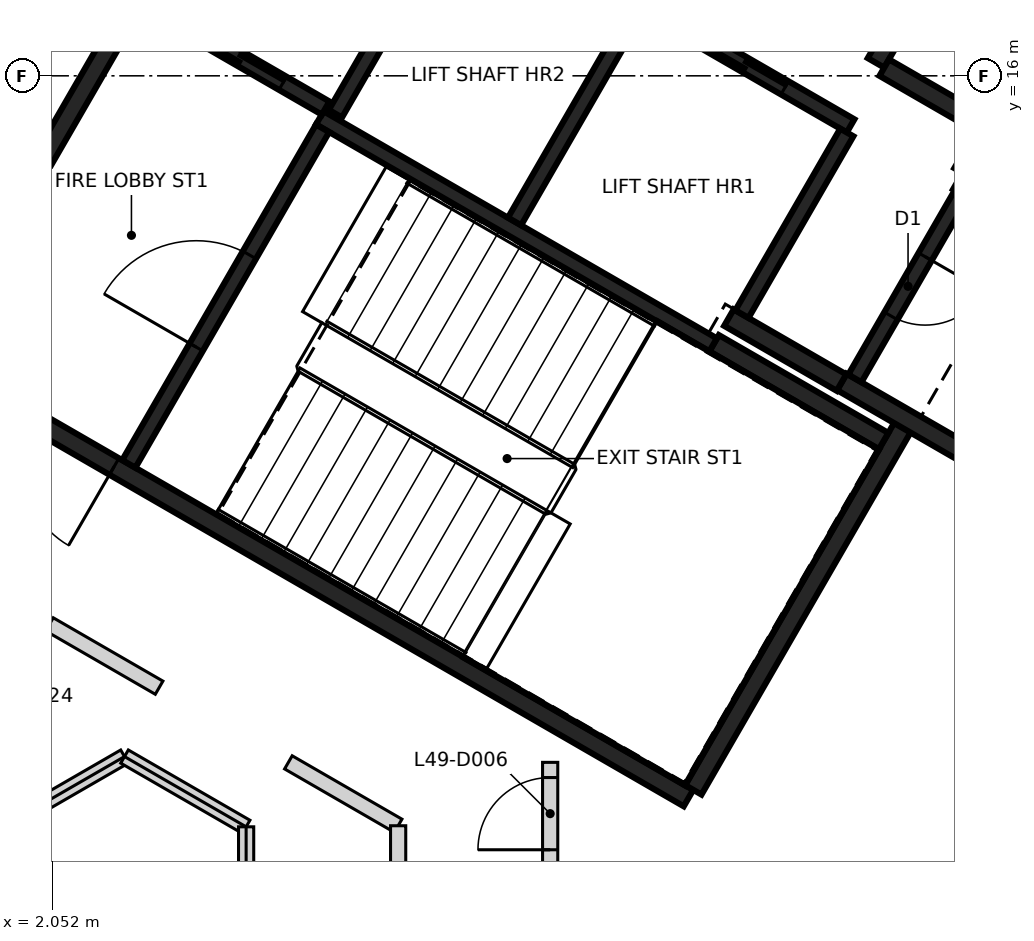
"""IFC4 building model, lengths in metres.
Left out: names, types, materials, properties, quantities, classifications, styles, units other than length and angle.
Written with IfcOpenShell. Run it as: python <this file> out.ifc"""

import sys

from ifc_helpers import new_model, si_unit, direction, frame, frame_2d, origin, place, context, subcontext, project, spatial, rectangle, extrude, element, fill, save


model = new_model("IFC4")
c1 = context("Model", 3, precision=1e-05, world=origin(), true_north=direction((0.0, 1.0)))
c2 = subcontext(c1, "Body", "Model", "MODEL_VIEW")
j1 = project(units=[si_unit("LENGTHUNIT", "METRE"), si_unit("PLANEANGLEUNIT", "RADIAN")], contexts=[c1])
p1 = place(None, origin())
s1 = spatial("IfcSite", under=j1, at=p1, CompositionType="ELEMENT")
p2 = place(p1, origin())
s2 = spatial("IfcBuilding", under=s1, at=p2, CompositionType="ELEMENT")
p3 = place(p2, frame((0.0, 0.0, 197.2)))
s3 = spatial("IfcBuildingStorey", under=s2, at=p3, CompositionType="ELEMENT", Elevation=197.2)
p4 = place(p3, frame((10.42, 6.498, 0.0), z_axis=(0.0, 0.0, 1.0), x_axis=(-0.866021906294, 0.500006057782, 0.0)))
e1 = element("IfcWall", 1, at=p4, inside=s3, PredefinedType="SHEAR", context=c2, shape_type="SweptSolid", body=[
    extrude(rectangle(XDim=11.55, YDim=0.25, at=frame_2d((5.775, 0.0))), origin(), (0.0, 0.0, 1.0), 3.25),
])
p5 = place(p4, frame((10.025, 0.0, 0.0)))
e2 = element("IfcOpeningElement", 2, at=p5, cuts=e1, PredefinedType="OPENING", context=c2, shape_type="SweptSolid", body=[
    extrude(rectangle(XDim=1.2, YDim=2.1, at=frame_2d((0.6, 1.05))), frame((0.0, 0.135, 0.0), z_axis=(0.0, -1.0, 0.0), x_axis=(1.0, 0.0, 0.0)), (0.0, 0.0, 1.0), 0.27),
])
p6 = place(p4, frame((8.725, 0.0, 0.0)))
e3 = element("IfcOpeningElement", 3, at=p6, cuts=e1, PredefinedType="OPENING", context=c2, shape_type="SweptSolid", body=[
    extrude(rectangle(XDim=1.2, YDim=2.1, at=frame_2d((0.6, 1.05))), frame((0.0, 0.135, 0.0), z_axis=(0.0, -1.0, 0.0), x_axis=(1.0, 0.0, 0.0)), (0.0, 0.0, 1.0), 0.27),
])
p7 = place(p3, frame((0.48, 12.381, 0.0), z_axis=(0.0, 0.0, 1.0), x_axis=(0.49999885962, 0.866026062182, 0.0)))
e4 = element("IfcWall", 4, at=p7, inside=s3, PredefinedType="SHEAR", context=c2, shape_type="SweptSolid", body=[
    extrude(rectangle(XDim=5.225, YDim=0.25, at=frame_2d((2.612, 0.0))), origin(), (0.0, 0.0, 1.0), 3.25),
])
p8 = place(p3, frame((13.238, 11.378, 0.0), z_axis=(0.0, 0.0, 1.0), x_axis=(-0.500008851346, -0.866020293397, 0.0)))
e5 = element("IfcWall", 5, at=p8, inside=s3, PredefinedType="SHEAR", context=c2, shape_type="SweptSolid", body=[
    extrude(rectangle(XDim=5.51, YDim=0.25, at=frame_2d((2.755, 0.0))), origin(), (0.0, 0.0, 1.0), 3.25),
])
p9 = place(p3, frame((14.918, 10.54, 0.0), z_axis=(0.0, 0.0, 1.0), x_axis=(-0.866063538972, 0.499933942099, 0.0)))
e6 = element("IfcWall", 6, at=p9, inside=s3, PredefinedType="SHEAR", context=c2, shape_type="SweptSolid", body=[
    extrude(rectangle(XDim=2.865, YDim=0.25, at=frame_2d((1.432, 0.0))), origin(), (0.0, 0.0, 1.0), 3.25),
])
p10 = place(p3, frame((13.963, 14.614, 0.0), z_axis=(0.0, 0.0, 1.0), x_axis=(0.866042235819, -0.499970844928, 0.0)))
e7 = element("IfcWall", 7, at=p10, inside=s3, PredefinedType="SHEAR", context=c2, shape_type="SweptSolid", body=[
    extrude(rectangle(XDim=2.865, YDim=0.25, at=frame_2d((1.432, 0.0))), origin(), (0.0, 0.0, 1.0), 3.25),
])
p11 = place(p3, frame((10.757, 12.481, 0.0), z_axis=(0.0, 0.0, 1.0), x_axis=(0.866022940537, -0.500004266446, 0.0)))
e8 = element("IfcWall", 8, at=p11, inside=s3, PredefinedType="SHEAR", context=c2, shape_type="SweptSolid", body=[
    extrude(rectangle(XDim=2.575, YDim=0.25, at=frame_2d((1.287, 0.0))), origin(), (0.0, 0.0, 1.0), 3.25),
])
p12 = place(p3, frame((13.819, 17.785, 0.0), z_axis=(0.0, 0.0, 1.0), x_axis=(-0.500039802285, -0.866002422705, 0.0)))
e9 = element("IfcWall", 9, at=p12, inside=s3, PredefinedType="SHEAR", context=c2, shape_type="SweptSolid", body=[
    extrude(rectangle(XDim=1.865, YDim=0.25, at=frame_2d((0.932, 0.0))), origin(), (0.0, 0.0, 1.0), 3.25),
])
p13 = place(p3, frame((12.433, 11.964, 0.0), z_axis=(0.0, 0.0, 1.0), x_axis=(-0.866038183914, 0.499977863513, 0.0)))
e10 = element("IfcWall", 10, at=p13, inside=s3, PredefinedType="SHEAR", context=c2, shape_type="SweptSolid", body=[
    extrude(rectangle(XDim=1.71, YDim=0.25, at=frame_2d((0.855, 0.0))), origin(), (0.0, 0.0, 1.0), 3.25),
])
p14 = place(p3, frame((12.995, 16.108, 0.0), z_axis=(0.0, 0.0, 1.0), x_axis=(0.866044474677, -0.49996696679, 0.0)))
e11 = element("IfcWall", 11, at=p14, inside=s3, PredefinedType="SHEAR", context=c2, shape_type="SweptSolid", body=[
    extrude(rectangle(XDim=1.584, YDim=0.25, at=frame_2d((0.792, 0.0))), origin(), (0.0, 0.0, 1.0), 3.25),
])
p15 = place(p3, frame((14.305, 15.207, 0.0), z_axis=(0.0, 0.0, 1.0), x_axis=(-0.499848422343, -0.866112899501, 0.0)))
e12 = element("IfcWall", 12, at=p15, inside=s3, PredefinedType="SHEAR", context=c2, shape_type="SweptSolid", body=[
    extrude(rectangle(XDim=0.559, YDim=0.25, at=frame_2d((0.28, 0.0))), origin(), (0.0, 0.0, 1.0), 3.25),
])
p16 = place(p3, frame((12.552, 15.342, 0.0), z_axis=(0.0, 0.0, 1.0), x_axis=(-0.866030299012, 0.499991521122, 0.0)))
e13 = element("IfcWall", 13, at=p16, inside=s3, PredefinedType="SHEAR", context=c2, shape_type="SweptSolid", body=[
    extrude(rectangle(XDim=6.1, YDim=0.2, at=frame_2d((3.05, 0.0))), origin(), (0.0, 0.0, 1.0), 3.25),
])
p17 = place(p16, frame((1.0, 0.0, 0.0)))
e14 = element("IfcOpeningElement", 14, at=p17, cuts=e13, PredefinedType="OPENING", context=c2, shape_type="SweptSolid", body=[
    extrude(rectangle(XDim=1.2, YDim=2.1, at=frame_2d((0.6, 1.05))), frame((0.0, 0.11, 0.0), z_axis=(0.0, -1.0, 0.0), x_axis=(1.0, 0.0, 0.0)), (0.0, 0.0, 1.0), 0.22),
])
p18 = place(p16, frame((3.982, 0.0, 0.0)))
e15 = element("IfcOpeningElement", 15, at=p18, cuts=e13, PredefinedType="OPENING", context=c2, shape_type="SweptSolid", body=[
    extrude(rectangle(XDim=1.2, YDim=2.1, at=frame_2d((0.6, 1.05))), frame((0.0, 0.11, 0.0), z_axis=(0.0, -1.0, 0.0), x_axis=(1.0, 0.0, 0.0)), (0.0, 0.0, 1.0), 0.22),
])
p19 = place(p3, frame((10.743, 12.46, 0.0), z_axis=(0.0, 0.0, 1.0), x_axis=(-0.866018848283, 0.500011354289, 0.0)))
e16 = element("IfcWall", 16, at=p19, inside=s3, PredefinedType="SHEAR", context=c2, shape_type="SweptSolid", body=[
    extrude(rectangle(XDim=5.974, YDim=0.2, at=frame_2d((2.987, 0.0))), origin(), (0.0, 0.0, 1.0), 3.25),
])
p20 = place(p3, frame((3.057, 10.895, 0.0), z_axis=(0.0, 0.0, 1.0), x_axis=(0.500027839223, 0.866009330205, 0.0)))
e17 = element("IfcWall", 17, at=p20, inside=s3, PredefinedType="SHEAR", context=c2, shape_type="SweptSolid", body=[
    extrude(rectangle(XDim=5.098, YDim=0.2, at=frame_2d((2.549, 0.0))), origin(), (0.0, 0.0, 1.0), 3.25),
])
p21 = place(p20, frame((1.774, 0.0, 0.0)))
e18 = element("IfcOpeningElement", 18, at=p21, cuts=e17, PredefinedType="OPENING", context=c2, shape_type="SweptSolid", body=[
    extrude(rectangle(XDim=1.4, YDim=2.1, at=frame_2d((0.7, 1.05))), frame((0.0, 0.11, 0.0), z_axis=(0.0, -1.0, 0.0), x_axis=(1.0, 0.0, 0.0)), (0.0, 0.0, 1.0), 0.22),
])
p22 = place(p3, frame((8.132, 14.084, 0.0), z_axis=(0.0, 0.0, 1.0), x_axis=(0.500030834389, 0.86600760081, 0.0)))
e19 = element("IfcWall", 19, at=p22, inside=s3, PredefinedType="SHEAR", context=c2, shape_type="SweptSolid", body=[
    extrude(rectangle(XDim=3.198, YDim=0.2, at=frame_2d((1.599, 0.0))), origin(), (0.0, 0.0, 1.0), 3.25),
])
p23 = place(p3, frame((14.008, 14.442, 0.0), z_axis=(0.0, 0.0, 1.0), x_axis=(-0.499986818241, -0.866033014143, 0.0)))
e20 = element("IfcWall", 20, at=p23, inside=s3, PredefinedType="SHEAR", context=c2, shape_type="SweptSolid", body=[
    extrude(rectangle(XDim=2.798, YDim=0.2, at=frame_2d((1.399, 0.0))), origin(), (0.0, 0.0, 1.0), 3.25),
])
p24 = place(p23, frame((0.949, 0.0, 0.0)))
e21 = element("IfcOpeningElement", 21, at=p24, cuts=e20, PredefinedType="OPENING", context=c2, shape_type="SweptSolid", body=[
    extrude(rectangle(XDim=0.9, YDim=2.1, at=frame_2d((0.45, 1.05))), frame((0.0, 0.11, 0.0), z_axis=(0.0, -1.0, 0.0), x_axis=(1.0, 0.0, 0.0)), (0.0, 0.0, 1.0), 0.22),
])
p25 = place(p3, frame((12.502, 15.255, 0.0), z_axis=(0.0, 0.0, 1.0), x_axis=(-0.499965018551, -0.866045599391, 0.0)))
e22 = element("IfcWall", 22, at=p25, inside=s3, PredefinedType="SHEAR", context=c2, shape_type="SweptSolid", body=[
    extrude(rectangle(XDim=2.759, YDim=0.2, at=frame_2d((1.379, 0.0))), origin(), (0.0, 0.0, 1.0), 3.25),
])
p26 = place(p3, frame((7.324, 18.187, 0.0), z_axis=(0.0, 0.0, 1.0), x_axis=(-0.499967891604, -0.866043940782, 0.0)))
e23 = element("IfcWall", 23, at=p26, inside=s3, PredefinedType="SHEAR", context=c2, shape_type="SweptSolid", body=[
    extrude(rectangle(XDim=3.1, YDim=0.2, at=frame_2d((1.55, 0.0))), origin(), (0.0, 0.0, 1.0), 3.25),
])
p27 = place(p3, frame((5.646, 15.576, 0.0), z_axis=(0.0, 0.0, 1.0), x_axis=(-0.866018407898, 0.500012117035, 0.0)))
e24 = element("IfcWall", 24, at=p27, inside=s3, PredefinedType="SHEAR", context=c2, shape_type="SweptSolid", body=[
    extrude(rectangle(XDim=2.651, YDim=0.2, at=frame_2d((1.325, 0.0))), origin(), (0.0, 0.0, 1.0), 3.25),
])
p28 = place(p27, frame((0.652, 0.0, 0.0)))
e25 = element("IfcOpeningElement", 25, at=p28, cuts=e24, PredefinedType="OPENING", context=c2, shape_type="SweptSolid", body=[
    extrude(rectangle(XDim=1.3, YDim=2.1, at=frame_2d((0.65, 1.05))), frame((0.0, 0.11, 0.0), z_axis=(0.0, -1.0, 0.0), x_axis=(1.0, 0.0, 0.0)), (0.0, 0.0, 1.0), 0.22),
])
p29 = place(p3, frame((-8.611, 2.648, 0.0), z_axis=(0.0, 0.0, 1.0), x_axis=(0.865953566425, 0.500124405319, 0.0)))
e26 = element("IfcWall", 26, at=p29, inside=s3, PredefinedType="PARTITIONING", context=c2, shape_type="SweptSolid", body=[
    extrude(rectangle(XDim=12.267, YDim=0.2, at=frame_2d((6.134, 0.0))), origin(), (0.0, 0.0, 1.0), 3.25),
])
p30 = place(p29, frame((9.904, 0.0, 0.0)))
e27 = element("IfcOpeningElement", 27, at=p30, cuts=e26, PredefinedType="OPENING", context=c2, shape_type="SweptSolid", body=[
    extrude(rectangle(XDim=0.9, YDim=2.1, at=frame_2d((0.45, 1.05))), frame((0.0, 0.11, 0.0), z_axis=(0.0, -1.0, 0.0), x_axis=(1.0, 0.0, 0.0)), (0.0, 0.0, 1.0), 0.22),
])
p31 = place(p29, frame((5.683, 0.0, 0.0)))
e28 = element("IfcOpeningElement", 28, at=p31, cuts=e26, PredefinedType="OPENING", context=c2, shape_type="SweptSolid", body=[
    extrude(rectangle(XDim=0.9, YDim=2.1, at=frame_2d((0.45, 1.05))), frame((0.0, 0.11, 0.0), z_axis=(0.0, -1.0, 0.0), x_axis=(1.0, 0.0, 0.0)), (0.0, 0.0, 1.0), 0.22),
])
p32 = place(p29, frame((1.463, 0.0, 0.0)))
e29 = element("IfcOpeningElement", 29, at=p32, cuts=e26, PredefinedType="OPENING", context=c2, shape_type="SweptSolid", body=[
    extrude(rectangle(XDim=0.9, YDim=2.1, at=frame_2d((0.45, 1.05))), frame((0.0, 0.11, 0.0), z_axis=(0.0, -1.0, 0.0), x_axis=(1.0, 0.0, 0.0)), (0.0, 0.0, 1.0), 0.22),
])
p33 = place(p3, frame((-1.086, 12.65, 0.0), z_axis=(0.0, 0.0, 1.0), x_axis=(0.492507119433, 0.870308415051, 0.0)))
e30 = element("IfcWall", 30, at=p33, inside=s3, PredefinedType="PARTITIONING", context=c2, shape_type="SweptSolid", body=[
    extrude(rectangle(XDim=10.531, YDim=0.2, at=frame_2d((5.266, 0.0))), origin(), (0.0, 0.0, 1.0), 3.25),
])
p34 = place(p33, frame((8.411, 0.0, 0.0)))
e31 = element("IfcOpeningElement", 31, at=p34, cuts=e30, PredefinedType="OPENING", context=c2, shape_type="SweptSolid", body=[
    extrude(rectangle(XDim=0.9, YDim=2.1, at=frame_2d((0.45, 1.05))), frame((0.0, 0.11, 0.0), z_axis=(0.0, -1.0, 0.0), x_axis=(1.0, 0.0, 0.0)), (0.0, 0.0, 1.0), 0.22),
])
p35 = place(p33, frame((3.664, 0.0, 0.0)))
e32 = element("IfcOpeningElement", 32, at=p35, cuts=e30, PredefinedType="OPENING", context=c2, shape_type="SweptSolid", body=[
    extrude(rectangle(XDim=0.95, YDim=2.1, at=frame_2d((0.475, 1.05))), frame((0.0, 0.11, 0.0), z_axis=(0.0, -1.0, 0.0), x_axis=(1.0, 0.0, 0.0)), (0.0, 0.0, 1.0), 0.22),
])
p36 = place(p3, frame((2.012, 8.784, 0.0), z_axis=(0.0, 0.0, 1.0), x_axis=(0.865934186891, -0.500157959022, 0.0)))
e33 = element("IfcWall", 33, at=p36, inside=s3, PredefinedType="PARTITIONING", context=c2, shape_type="SweptSolid", body=[
    extrude(rectangle(XDim=1.666, YDim=0.2, at=frame_2d((0.833, 0.0))), origin(), (0.0, 0.0, 1.0), 3.25),
])
p37 = place(p3, frame((5.156, 6.968, 0.0), z_axis=(0.0, 0.0, 1.0), x_axis=(0.865963705197, -0.500106849865, 0.0)))
e34 = element("IfcWall", 34, at=p37, inside=s3, PredefinedType="PARTITIONING", context=c2, shape_type="SweptSolid", body=[
    extrude(rectangle(XDim=1.668, YDim=0.2, at=frame_2d((0.834, 0.0))), origin(), (0.0, 0.0, 1.0), 3.25),
])
p38 = place(p3, frame((6.6, -6.134, 0.0), z_axis=(0.0, 0.0, 1.0), x_axis=(0.0, 1.0, 0.0)))
e35 = element("IfcWall", 35, at=p38, inside=s3, PredefinedType="PARTITIONING", context=c2, shape_type="SweptSolid", body=[
    extrude(rectangle(XDim=12.268, YDim=0.2, at=frame_2d((6.134, 0.0))), origin(), (0.0, 0.0, 1.0), 3.25),
])
p39 = place(p38, frame((1.463, 0.0, 0.0)))
e36 = element("IfcOpeningElement", 36, at=p39, cuts=e35, PredefinedType="OPENING", context=c2, shape_type="SweptSolid", body=[
    extrude(rectangle(XDim=0.9, YDim=2.1, at=frame_2d((0.45, 1.05))), frame((0.0, 0.11, 0.0), z_axis=(0.0, -1.0, 0.0), x_axis=(1.0, 0.0, 0.0)), (0.0, 0.0, 1.0), 0.22),
])
p40 = place(p38, frame((5.684, 0.0, 0.0)))
e37 = element("IfcOpeningElement", 37, at=p40, cuts=e35, PredefinedType="OPENING", context=c2, shape_type="SweptSolid", body=[
    extrude(rectangle(XDim=0.9, YDim=2.1, at=frame_2d((0.45, 1.05))), frame((0.0, 0.11, 0.0), z_axis=(0.0, -1.0, 0.0), x_axis=(1.0, 0.0, 0.0)), (0.0, 0.0, 1.0), 0.22),
])
p41 = place(p38, frame((9.905, 0.0, 0.0)))
e38 = element("IfcOpeningElement", 38, at=p41, cuts=e35, PredefinedType="OPENING", context=c2, shape_type="SweptSolid", body=[
    extrude(rectangle(XDim=0.9, YDim=2.1, at=frame_2d((0.45, 1.05))), frame((0.0, 0.11, 0.0), z_axis=(0.0, -1.0, 0.0), x_axis=(1.0, 0.0, 0.0)), (0.0, 0.0, 1.0), 0.22),
])
p42 = place(p3, frame((8.6, -4.966, 0.0), z_axis=(0.0, 0.0, 1.0), x_axis=(0.0, 1.0, 0.0)))
e39 = element("IfcWall", 39, at=p42, inside=s3, PredefinedType="PARTITIONING", context=c2, shape_type="SweptSolid", body=[
    extrude(rectangle(XDim=11.934, YDim=0.2, at=frame_2d((5.967, 0.0))), origin(), (0.0, 0.0, 1.0), 3.25),
])
p43 = place(p42, frame((0.83, 0.0, 0.0)))
e40 = element("IfcOpeningElement", 40, at=p43, cuts=e39, PredefinedType="OPENING", context=c2, shape_type="SweptSolid", body=[
    extrude(rectangle(XDim=1.0, YDim=2.1, at=frame_2d((0.5, 1.05))), frame((0.0, 0.11, 0.0), z_axis=(0.0, -1.0, 0.0), x_axis=(1.0, 0.0, 0.0)), (0.0, 0.0, 1.0), 0.22),
])
p44 = place(p42, frame((2.835, 0.0, 0.0)))
e41 = element("IfcOpeningElement", 41, at=p44, cuts=e39, PredefinedType="OPENING", context=c2, shape_type="SweptSolid", body=[
    extrude(rectangle(XDim=0.95, YDim=2.1, at=frame_2d((0.475, 1.05))), frame((0.0, 0.11, 0.0), z_axis=(0.0, -1.0, 0.0), x_axis=(1.0, 0.0, 0.0)), (0.0, 0.0, 1.0), 0.22),
])
p45 = place(p42, frame((10.784, 0.0, 0.0)))
e42 = element("IfcOpeningElement", 42, at=p45, cuts=e39, PredefinedType="OPENING", context=c2, shape_type="SweptSolid", body=[
    extrude(rectangle(XDim=0.95, YDim=2.1, at=frame_2d((0.475, 1.05))), frame((0.0, 0.11, 0.0), z_axis=(0.0, -1.0, 0.0), x_axis=(1.0, 0.0, 0.0)), (0.0, 0.0, 1.0), 0.22),
])
p46 = place(p3, frame((-7.599, 0.923, 0.0), z_axis=(0.0, 0.0, 1.0), x_axis=(0.865957029593, 0.500118408877, 0.0)))
e43 = element("IfcWall", 43, at=p46, inside=s3, PredefinedType="PARTITIONING", context=c2, shape_type="SweptSolid", body=[
    extrude(rectangle(XDim=12.24, YDim=0.2, at=frame_2d((6.12, 0.0))), origin(), (0.0, 0.0, 1.0), 3.25),
])
p47 = place(p3, frame((3.0, 7.044, 0.0), z_axis=(0.0, 0.0, 1.0), x_axis=(0.865875248522, -0.500259986404, 0.0)))
e44 = element("IfcWall", 44, at=p47, inside=s3, PredefinedType="PARTITIONING", context=c2, shape_type="SweptSolid", body=[
    extrude(rectangle(XDim=1.848, YDim=0.2, at=frame_2d((0.924, 0.0))), origin(), (0.0, 0.0, 1.0), 3.25),
])
p48 = place(p3, frame((4.6, -6.12, 0.0), z_axis=(0.0, 0.0, 1.0), x_axis=(0.0, 1.0, 0.0)))
e45 = element("IfcWall", 45, at=p48, inside=s3, PredefinedType="PARTITIONING", context=c2, shape_type="SweptSolid", body=[
    extrude(rectangle(XDim=12.24, YDim=0.2, at=frame_2d((6.12, 0.0))), origin(), (0.0, 0.0, 1.0), 3.25),
])
p49 = place(p28, origin())
e46 = element("IfcDoor", 46, at=p49, inside=s3, OperationType="SLIDING_TO_RIGHT", PredefinedType="DOOR", context=c2, shape_type="SweptSolid", body=[
    extrude(rectangle(XDim=1.3, YDim=2.1, at=frame_2d((0.65, 1.05))), frame((0.0, 0.025, 0.0), z_axis=(0.0, -1.0, 0.0), x_axis=(1.0, 0.0, 0.0)), (0.0, 0.0, 1.0), 0.05),
])
fill(e25, e46)
p50 = place(p17, origin())
e47 = element("IfcDoor", 47, at=p50, inside=s3, OperationType="DOUBLE_DOOR_SLIDING", PredefinedType="DOOR", context=c2, shape_type="SweptSolid", body=[
    extrude(rectangle(XDim=1.2, YDim=2.1, at=frame_2d((0.6, 1.05))), frame((0.0, 0.025, 0.0), z_axis=(0.0, -1.0, 0.0), x_axis=(1.0, 0.0, 0.0)), (0.0, 0.0, 1.0), 0.05),
])
fill(e14, e47)
p51 = place(p6, origin())
e48 = element("IfcDoor", 48, at=p51, inside=s3, OperationType="SINGLE_SWING_RIGHT", PredefinedType="DOOR", context=c2, shape_type="SweptSolid", body=[
    extrude(rectangle(XDim=1.2, YDim=2.1, at=frame_2d((0.6, 1.05))), frame((0.0, 0.025, 0.0), z_axis=(0.0, -1.0, 0.0), x_axis=(1.0, 0.0, 0.0)), (0.0, 0.0, 1.0), 0.05),
])
fill(e3, e48)
p52 = place(p21, origin())
e49 = element("IfcDoor", 49, at=p52, inside=s3, OperationType="SINGLE_SWING_RIGHT", PredefinedType="DOOR", context=c2, shape_type="SweptSolid", body=[
    extrude(rectangle(XDim=1.4, YDim=2.1, at=frame_2d((0.7, 1.05))), frame((0.0, 0.025, 0.0), z_axis=(0.0, -1.0, 0.0), x_axis=(1.0, 0.0, 0.0)), (0.0, 0.0, 1.0), 0.05),
])
fill(e18, e49)
p53 = place(p24, origin())
e50 = element("IfcDoor", 50, at=p53, inside=s3, OperationType="SINGLE_SWING_LEFT", PredefinedType="DOOR", context=c2, shape_type="SweptSolid", body=[
    extrude(rectangle(XDim=0.9, YDim=2.1, at=frame_2d((0.45, 1.05))), frame((0.0, 0.025, 0.0), z_axis=(0.0, -1.0, 0.0), x_axis=(1.0, 0.0, 0.0)), (0.0, 0.0, 1.0), 0.05),
])
fill(e21, e50)
p54 = place(p45, frame((0.95, 0.0, 0.0), z_axis=(0.0, 0.0, 1.0), x_axis=(-1.0, 0.0, 0.0)))
e51 = element("IfcDoor", 51, at=p54, inside=s3, OperationType="SINGLE_SWING_LEFT", PredefinedType="DOOR", context=c2, shape_type="SweptSolid", body=[
    extrude(rectangle(XDim=0.95, YDim=2.1, at=frame_2d((0.475, 1.05))), frame((0.0, 0.025, 0.0), z_axis=(0.0, -1.0, 0.0), x_axis=(1.0, 0.0, 0.0)), (0.0, 0.0, 1.0), 0.05),
])
fill(e42, e51)
save(model, sys.argv[1])
